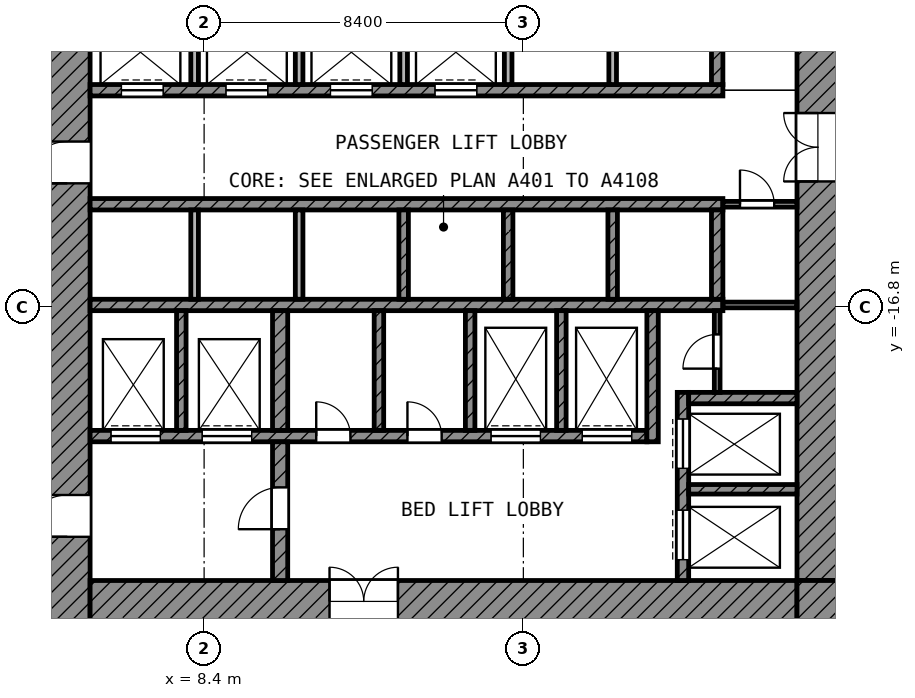
"""IFC4 building model, lengths in metres.
Left out: names, types, materials, properties, quantities, classifications, styles, units other than length and angle.
Written with IfcOpenShell. Run it as: python <this file> out.ifc"""

import sys

from ifc_helpers import new_model, si_unit, direction, frame, frame_2d, origin, place, context, subcontext, project, spatial, rectangle, extrude, element, fill, save


model = new_model("IFC4")
c1 = context("Model", 3, precision=1e-05, world=origin(), true_north=direction((0.0, 1.0)))
c2 = subcontext(c1, "Body", "Model", "MODEL_VIEW")
j1 = project(units=[si_unit("LENGTHUNIT", "METRE"), si_unit("PLANEANGLEUNIT", "RADIAN")], contexts=[c1])
p1 = place(None, origin())
s1 = spatial("IfcSite", under=j1, at=p1, CompositionType="ELEMENT")
p2 = place(p1, origin())
s2 = spatial("IfcBuilding", under=s1, at=p2, CompositionType="ELEMENT")
p3 = place(p2, frame((0.0, 0.0, 89.6)))
s3 = spatial("IfcBuildingStorey", under=s2, at=p3, CompositionType="ELEMENT", Elevation=89.6)
p4 = place(p3, frame((4.8, -25.1, 0.0), z_axis=(0.0, 0.0, 1.0), x_axis=(0.0, 1.0, 0.0)))
e1 = element("IfcWall", 1, at=p4, inside=s3, PredefinedType="SHEAR", context=c2, shape_type="SweptSolid", body=[
    extrude(rectangle(XDim=19.7, YDim=1.2, at=frame_2d((9.85, 0.0))), origin(), (0.0, 0.0, 1.0), 3.7),
])
p5 = place(p4, frame((11.55, 0.0, 0.0)))
e2 = element("IfcOpeningElement", 2, at=p5, cuts=e1, PredefinedType="OPENING", context=c2, shape_type="SweptSolid", body=[
    extrude(rectangle(XDim=1.1, YDim=2.1, at=frame_2d((0.55, 1.05))), frame((0.0, 0.61, 0.0), z_axis=(0.0, -1.0, 0.0), x_axis=(1.0, 0.0, 0.0)), (0.0, 0.0, 1.0), 1.22),
])
p6 = place(p4, frame((2.25, 0.0, 0.0)))
e3 = element("IfcOpeningElement", 3, at=p6, cuts=e1, PredefinedType="OPENING", context=c2, shape_type="SweptSolid", body=[
    extrude(rectangle(XDim=1.1, YDim=2.1, at=frame_2d((0.55, 1.05))), frame((0.0, 0.61, 0.0), z_axis=(0.0, -1.0, 0.0), x_axis=(1.0, 0.0, 0.0)), (0.0, 0.0, 1.0), 1.22),
])
p7 = place(p3, frame((24.55, -24.0, 0.0), z_axis=(0.0, 0.0, 1.0), x_axis=(0.0, 1.0, 0.0)))
e4 = element("IfcWall", 4, at=p7, inside=s3, PredefinedType="SHEAR", context=c2, shape_type="SweptSolid", body=[
    extrude(rectangle(XDim=18.6, YDim=1.1, at=frame_2d((9.3, 0.0))), origin(), (0.0, 0.0, 1.0), 3.7),
])
p8 = place(p7, frame((10.5, 0.0, 0.0)))
e5 = element("IfcOpeningElement", 5, at=p8, cuts=e4, PredefinedType="OPENING", context=c2, shape_type="SweptSolid", body=[
    extrude(rectangle(XDim=1.8, YDim=2.1, at=frame_2d((0.9, 1.05))), frame((0.0, 0.56, 0.0), z_axis=(0.0, -1.0, 0.0), x_axis=(1.0, 0.0, 0.0)), (0.0, 0.0, 1.0), 1.12),
])
p9 = place(p3, frame((5.4, -24.55, 0.0), z_axis=(0.0, 0.0, 1.0), x_axis=(1.0, 0.0, 0.0)))
e6 = element("IfcWall", 6, at=p9, inside=s3, PredefinedType="SHEAR", context=c2, shape_type="SweptSolid", body=[
    extrude(rectangle(XDim=18.6, YDim=1.1, at=frame_2d((9.3, 0.0))), origin(), (0.0, 0.0, 1.0), 3.7),
])
p10 = place(p9, frame((6.3, 0.0, 0.0)))
e7 = element("IfcOpeningElement", 7, at=p10, cuts=e6, PredefinedType="OPENING", context=c2, shape_type="SweptSolid", body=[
    extrude(rectangle(XDim=1.8, YDim=2.1, at=frame_2d((0.9, 1.05))), frame((0.0, 0.56, 0.0), z_axis=(0.0, -1.0, 0.0), x_axis=(1.0, 0.0, 0.0)), (0.0, 0.0, 1.0), 1.12),
])
p11 = place(p3, frame((24.55, -25.1, 0.0), z_axis=(0.0, 0.0, 1.0), x_axis=(0.0, 1.0, 0.0)))
e8 = element("IfcWall", 8, at=p11, inside=s3, PredefinedType="SHEAR", context=c2, shape_type="SweptSolid", body=[
    extrude(rectangle(XDim=1.1, YDim=1.1, at=frame_2d((0.55, 0.0))), origin(), (0.0, 0.0, 1.0), 3.7),
])
p12 = place(p3, frame((5.4, -11.1, 0.0), z_axis=(0.0, 0.0, 1.0), x_axis=(1.0, 0.0, 0.0)))
e9 = element("IfcWall", 9, at=p12, inside=s3, PredefinedType="SHEAR", context=c2, shape_type="SweptSolid", body=[
    extrude(rectangle(XDim=16.65, YDim=0.3, at=frame_2d((8.325, 0.0))), origin(), (0.0, 0.0, 1.0), 3.7),
])
p13 = place(p12, frame((0.825, 0.0, 0.0)))
e10 = element("IfcOpeningElement", 10, at=p13, cuts=e9, PredefinedType="OPENING", context=c2, shape_type="SweptSolid", body=[
    extrude(rectangle(XDim=1.1, YDim=2.1, at=frame_2d((0.55, 1.05))), frame((0.0, 0.16, 0.0), z_axis=(0.0, -1.0, 0.0), x_axis=(1.0, 0.0, 0.0)), (0.0, 0.0, 1.0), 0.32),
])
p14 = place(p12, frame((3.575, 0.0, 0.0)))
e11 = element("IfcOpeningElement", 11, at=p14, cuts=e9, PredefinedType="OPENING", context=c2, shape_type="SweptSolid", body=[
    extrude(rectangle(XDim=1.1, YDim=2.1, at=frame_2d((0.55, 1.05))), frame((0.0, 0.16, 0.0), z_axis=(0.0, -1.0, 0.0), x_axis=(1.0, 0.0, 0.0)), (0.0, 0.0, 1.0), 0.32),
])
p15 = place(p12, frame((6.325, 0.0, 0.0)))
e12 = element("IfcOpeningElement", 12, at=p15, cuts=e9, PredefinedType="OPENING", context=c2, shape_type="SweptSolid", body=[
    extrude(rectangle(XDim=1.1, YDim=2.1, at=frame_2d((0.55, 1.05))), frame((0.0, 0.16, 0.0), z_axis=(0.0, -1.0, 0.0), x_axis=(1.0, 0.0, 0.0)), (0.0, 0.0, 1.0), 0.32),
])
p16 = place(p12, frame((9.075, 0.0, 0.0)))
e13 = element("IfcOpeningElement", 13, at=p16, cuts=e9, PredefinedType="OPENING", context=c2, shape_type="SweptSolid", body=[
    extrude(rectangle(XDim=1.1, YDim=2.1, at=frame_2d((0.55, 1.05))), frame((0.0, 0.16, 0.0), z_axis=(0.0, -1.0, 0.0), x_axis=(1.0, 0.0, 0.0)), (0.0, 0.0, 1.0), 0.32),
])
for number, where, z_axis, x_axis in (
    (14, (5.4, -14.1, 0.0), (0.0, 0.0, 1.0), (1.0, 0.0, 0.0)),
    (15, (5.4, -16.75, 0.0), (0.0, 0.0, 1.0), (1.0, 0.0, 0.0)),
):
    element("IfcWall", number, at=place(p3, frame(where, z_axis=z_axis, x_axis=x_axis)), inside=s3, PredefinedType="SHEAR", context=c2, shape_type="SweptSolid", body=[
        extrude(rectangle(XDim=16.65, YDim=0.3, at=frame_2d((8.325, 0.0))), origin(), (0.0, 0.0, 1.0), 3.7),
    ])
p17 = place(p3, frame((5.4, -20.2, 0.0), z_axis=(0.0, 0.0, 1.0), x_axis=(1.0, 0.0, 0.0)))
e16 = element("IfcWall", 16, at=p17, inside=s3, PredefinedType="SHEAR", context=c2, shape_type="SweptSolid", body=[
    extrude(rectangle(XDim=14.65, YDim=0.3, at=frame_2d((7.325, 0.0))), origin(), (0.0, 0.0, 1.0), 3.7),
])
p18 = place(p17, frame((10.55, 0.0, 0.0)))
e17 = element("IfcOpeningElement", 17, at=p18, cuts=e16, PredefinedType="OPENING", context=c2, shape_type="SweptSolid", body=[
    extrude(rectangle(XDim=1.3, YDim=2.1, at=frame_2d((0.65, 1.05))), frame((0.0, 0.16, 0.0), z_axis=(0.0, -1.0, 0.0), x_axis=(1.0, 0.0, 0.0)), (0.0, 0.0, 1.0), 0.32),
])
p19 = place(p17, frame((12.95, 0.0, 0.0)))
e18 = element("IfcOpeningElement", 18, at=p19, cuts=e16, PredefinedType="OPENING", context=c2, shape_type="SweptSolid", body=[
    extrude(rectangle(XDim=1.3, YDim=2.1, at=frame_2d((0.65, 1.05))), frame((0.0, 0.16, 0.0), z_axis=(0.0, -1.0, 0.0), x_axis=(1.0, 0.0, 0.0)), (0.0, 0.0, 1.0), 0.32),
])
p20 = place(p17, frame((0.55, 0.0, 0.0)))
e19 = element("IfcOpeningElement", 19, at=p20, cuts=e16, PredefinedType="OPENING", context=c2, shape_type="SweptSolid", body=[
    extrude(rectangle(XDim=1.3, YDim=2.1, at=frame_2d((0.65, 1.05))), frame((0.0, 0.16, 0.0), z_axis=(0.0, -1.0, 0.0), x_axis=(1.0, 0.0, 0.0)), (0.0, 0.0, 1.0), 0.32),
])
p21 = place(p17, frame((2.95, 0.0, 0.0)))
e20 = element("IfcOpeningElement", 20, at=p21, cuts=e16, PredefinedType="OPENING", context=c2, shape_type="SweptSolid", body=[
    extrude(rectangle(XDim=1.3, YDim=2.1, at=frame_2d((0.65, 1.05))), frame((0.0, 0.16, 0.0), z_axis=(0.0, -1.0, 0.0), x_axis=(1.0, 0.0, 0.0)), (0.0, 0.0, 1.0), 0.32),
])
p22 = place(p17, frame((5.95, 0.0, 0.0)))
e21 = element("IfcOpeningElement", 21, at=p22, cuts=e16, PredefinedType="OPENING", context=c2, shape_type="SweptSolid", body=[
    extrude(rectangle(XDim=0.9, YDim=2.1, at=frame_2d((0.45, 1.05))), frame((0.0, 0.16, 0.0), z_axis=(0.0, -1.0, 0.0), x_axis=(1.0, 0.0, 0.0)), (0.0, 0.0, 1.0), 0.32),
])
p23 = place(p17, frame((8.35, 0.0, 0.0)))
e22 = element("IfcOpeningElement", 22, at=p23, cuts=e16, PredefinedType="OPENING", context=c2, shape_type="SweptSolid", body=[
    extrude(rectangle(XDim=0.9, YDim=2.1, at=frame_2d((0.45, 1.05))), frame((0.0, 0.16, 0.0), z_axis=(0.0, -1.0, 0.0), x_axis=(1.0, 0.0, 0.0)), (0.0, 0.0, 1.0), 0.32),
])
p24 = place(p3, frame((10.4, -24.0, 0.0), z_axis=(0.0, 0.0, 1.0), x_axis=(0.0, 1.0, 0.0)))
e23 = element("IfcWall", 23, at=p24, inside=s3, PredefinedType="SHEAR", context=c2, shape_type="SweptSolid", body=[
    extrude(rectangle(XDim=3.65, YDim=0.4, at=frame_2d((1.825, 0.0))), origin(), (0.0, 0.0, 1.0), 3.7),
])
p25 = place(p24, frame((1.35, 0.0, 0.0)))
e24 = element("IfcOpeningElement", 24, at=p25, cuts=e23, PredefinedType="OPENING", context=c2, shape_type="SweptSolid", body=[
    extrude(rectangle(XDim=1.1, YDim=2.1, at=frame_2d((0.55, 1.05))), frame((0.0, 0.21, 0.0), z_axis=(0.0, -1.0, 0.0), x_axis=(1.0, 0.0, 0.0)), (0.0, 0.0, 1.0), 0.42),
])
p26 = place(p3, frame((10.4, -20.05, 0.0), z_axis=(0.0, 0.0, 1.0), x_axis=(0.0, 1.0, 0.0)))
e25 = element("IfcWall", 25, at=p26, inside=s3, PredefinedType="SHEAR", context=c2, shape_type="SweptSolid", body=[
    extrude(rectangle(XDim=3.15, YDim=0.4, at=frame_2d((1.575, 0.0))), origin(), (0.0, 0.0, 1.0), 3.7),
])
p27 = place(p3, frame((20.2, -20.35, 0.0), z_axis=(0.0, 0.0, 1.0), x_axis=(0.0, 1.0, 0.0)))
e26 = element("IfcWall", 26, at=p27, inside=s3, PredefinedType="SHEAR", context=c2, shape_type="SweptSolid", body=[
    extrude(rectangle(XDim=3.45, YDim=0.3, at=frame_2d((1.725, 0.0))), origin(), (0.0, 0.0, 1.0), 3.7),
])
p28 = place(p3, frame((21.9, -10.95, 0.0), z_axis=(0.0, 0.0, 1.0), x_axis=(0.0, 1.0, 0.0)))
e27 = element("IfcWall", 27, at=p28, inside=s3, PredefinedType="SHEAR", context=c2, shape_type="SweptSolid", body=[
    extrude(rectangle(XDim=2.35, YDim=0.3, at=frame_2d((1.175, 0.0))), origin(), (0.0, 0.0, 1.0), 3.7),
])
p29 = place(p3, frame((21.9, -16.6, 0.0), z_axis=(0.0, 0.0, 1.0), x_axis=(0.0, 1.0, 0.0)))
e28 = element("IfcWall", 28, at=p29, inside=s3, PredefinedType="SHEAR", context=c2, shape_type="SweptSolid", body=[
    extrude(rectangle(XDim=2.35, YDim=0.3, at=frame_2d((1.175, 0.0))), origin(), (0.0, 0.0, 1.0), 3.7),
])
p30 = place(p3, frame((21.15, -19.2, 0.0), z_axis=(0.0, 0.0, 1.0), x_axis=(1.0, 0.0, 0.0)))
e29 = element("IfcWall", 29, at=p30, inside=s3, PredefinedType="SHEAR", context=c2, shape_type="SweptSolid", body=[
    extrude(rectangle(XDim=2.85, YDim=0.3, at=frame_2d((1.425, 0.0))), origin(), (0.0, 0.0, 1.0), 3.7),
])
p31 = place(p3, frame((21.0, -24.0, 0.0), z_axis=(0.0, 0.0, 1.0), x_axis=(0.0, 1.0, 0.0)))
e30 = element("IfcWall", 30, at=p31, inside=s3, PredefinedType="SHEAR", context=c2, shape_type="SweptSolid", body=[
    extrude(rectangle(XDim=4.95, YDim=0.3, at=frame_2d((2.475, 0.0))), origin(), (0.0, 0.0, 1.0), 3.7),
])
p32 = place(p31, frame((2.95, 0.0, 0.0)))
e31 = element("IfcOpeningElement", 31, at=p32, cuts=e30, PredefinedType="OPENING", context=c2, shape_type="SweptSolid", body=[
    extrude(rectangle(XDim=1.3, YDim=2.1, at=frame_2d((0.65, 1.05))), frame((0.0, 0.16, 0.0), z_axis=(0.0, -1.0, 0.0), x_axis=(1.0, 0.0, 0.0)), (0.0, 0.0, 1.0), 0.32),
])
p33 = place(p31, frame((0.55, 0.0, 0.0)))
e32 = element("IfcOpeningElement", 32, at=p33, cuts=e30, PredefinedType="OPENING", context=c2, shape_type="SweptSolid", body=[
    extrude(rectangle(XDim=1.3, YDim=2.1, at=frame_2d((0.65, 1.05))), frame((0.0, 0.16, 0.0), z_axis=(0.0, -1.0, 0.0), x_axis=(1.0, 0.0, 0.0)), (0.0, 0.0, 1.0), 0.32),
])
p34 = place(p3, frame((21.15, -21.6, 0.0), z_axis=(0.0, 0.0, 1.0), x_axis=(1.0, 0.0, 0.0)))
e33 = element("IfcWall", 33, at=p34, inside=s3, PredefinedType="SHEAR", context=c2, shape_type="SweptSolid", body=[
    extrude(rectangle(XDim=2.85, YDim=0.25, at=frame_2d((1.425, 0.0))), origin(), (0.0, 0.0, 1.0), 3.7),
])
for number, where, z_axis, x_axis in (
    (34, (7.8, -20.05, 0.0), (0.0, 0.0, 1.0), (0.0, 1.0, 0.0)),
    (35, (13.0, -20.05, 0.0), (0.0, 0.0, 1.0), (0.0, 1.0, 0.0)),
    (36, (15.4, -20.05, 0.0), (0.0, 0.0, 1.0), (0.0, 1.0, 0.0)),
    (37, (17.8, -20.05, 0.0), (0.0, 0.0, 1.0), (0.0, 1.0, 0.0)),
):
    element("IfcWall", number, at=place(p3, frame(where, z_axis=z_axis, x_axis=x_axis)), inside=s3, PredefinedType="SHEAR", context=c2, shape_type="SweptSolid", body=[
        extrude(rectangle(XDim=3.15, YDim=0.25, at=frame_2d((1.575, 0.0))), origin(), (0.0, 0.0, 1.0), 3.7),
    ])
for number, where, z_axis, x_axis in (
    (38, (8.15, -10.95, 0.0), (0.0, 0.0, 1.0), (0.0, 1.0, 0.0)),
    (39, (10.9, -10.95, 0.0), (0.0, 0.0, 1.0), (0.0, 1.0, 0.0)),
    (40, (13.65, -10.95, 0.0), (0.0, 0.0, 1.0), (0.0, 1.0, 0.0)),
    (41, (16.4, -10.95, 0.0), (0.0, 0.0, 1.0), (0.0, 1.0, 0.0)),
    (42, (19.15, -10.95, 0.0), (0.0, 0.0, 1.0), (0.0, 1.0, 0.0)),
):
    element("IfcWall", number, at=place(p3, frame(where, z_axis=z_axis, x_axis=x_axis)), inside=s3, PredefinedType="PARTITIONING", context=c2, shape_type="SweptSolid", body=[
        extrude(rectangle(XDim=2.35, YDim=0.2, at=frame_2d((1.175, 0.0))), origin(), (0.0, 0.0, 1.0), 3.7),
    ])
for number, where, z_axis, x_axis in (
    (43, (8.15, -16.6, 0.0), (0.0, 0.0, 1.0), (0.0, 1.0, 0.0)),
    (44, (10.9, -16.6, 0.0), (0.0, 0.0, 1.0), (0.0, 1.0, 0.0)),
):
    element("IfcWall", number, at=place(p3, frame(where, z_axis=z_axis, x_axis=x_axis)), inside=s3, PredefinedType="PARTITIONING", context=c2, shape_type="SweptSolid", body=[
        extrude(rectangle(XDim=2.35, YDim=0.2, at=frame_2d((1.175, 0.0))), origin(), (0.0, 0.0, 1.0), 3.7),
    ])
for number, where, z_axis, x_axis in (
    (45, (13.65, -16.6, 0.0), (0.0, 0.0, 1.0), (0.0, 1.0, 0.0)),
    (46, (16.4, -16.6, 0.0), (0.0, 0.0, 1.0), (0.0, 1.0, 0.0)),
    (47, (19.15, -16.6, 0.0), (0.0, 0.0, 1.0), (0.0, 1.0, 0.0)),
):
    element("IfcWall", number, at=place(p3, frame(where, z_axis=z_axis, x_axis=x_axis)), inside=s3, PredefinedType="SHEAR", context=c2, shape_type="SweptSolid", body=[
        extrude(rectangle(XDim=2.35, YDim=0.25, at=frame_2d((1.175, 0.0))), origin(), (0.0, 0.0, 1.0), 3.7),
    ])
p35 = place(p3, frame((21.9, -19.05, 0.0), z_axis=(0.0, 0.0, 1.0), x_axis=(0.0, 1.0, 0.0)))
e48 = element("IfcWall", 48, at=p35, inside=s3, PredefinedType="PARTITIONING", context=c2, shape_type="SweptSolid", body=[
    extrude(rectangle(XDim=2.15, YDim=0.15, at=frame_2d((1.075, 0.0))), origin(), (0.0, 0.0, 1.0), 3.7),
])
p36 = place(p35, frame((0.625, 0.0, 0.0)))
e49 = element("IfcOpeningElement", 49, at=p36, cuts=e48, PredefinedType="OPENING", context=c2, shape_type="SweptSolid", body=[
    extrude(rectangle(XDim=0.9, YDim=2.1, at=frame_2d((0.45, 1.05))), frame((0.0, 0.085, 0.0), z_axis=(0.0, -1.0, 0.0), x_axis=(1.0, 0.0, 0.0)), (0.0, 0.0, 1.0), 0.17),
])
p37 = place(p3, frame((22.05, -16.75, 0.0), z_axis=(0.0, 0.0, 1.0), x_axis=(1.0, 0.0, 0.0)))
e50 = element("IfcWall", 50, at=p37, inside=s3, PredefinedType="PARTITIONING", context=c2, shape_type="SweptSolid", body=[
    extrude(rectangle(XDim=1.95, YDim=0.15, at=frame_2d((0.975, 0.0))), origin(), (0.0, 0.0, 1.0), 3.7),
])
p38 = place(p3, frame((22.05, -14.1, 0.0), z_axis=(0.0, 0.0, 1.0), x_axis=(1.0, 0.0, 0.0)))
e51 = element("IfcWall", 51, at=p38, inside=s3, PredefinedType="PARTITIONING", context=c2, shape_type="SweptSolid", body=[
    extrude(rectangle(XDim=1.95, YDim=0.15, at=frame_2d((0.975, 0.0))), origin(), (0.0, 0.0, 1.0), 3.7),
])
p39 = place(p38, frame((0.45, 0.0, 0.0)))
e52 = element("IfcOpeningElement", 52, at=p39, cuts=e51, PredefinedType="OPENING", context=c2, shape_type="SweptSolid", body=[
    extrude(rectangle(XDim=0.9, YDim=2.1, at=frame_2d((0.45, 1.05))), frame((0.0, 0.085, 0.0), z_axis=(0.0, -1.0, 0.0), x_axis=(1.0, 0.0, 0.0)), (0.0, 0.0, 1.0), 0.17),
])
p40 = place(p13, origin())
e53 = element("IfcDoor", 53, at=p40, inside=s3, OperationType="DOUBLE_DOOR_SLIDING", PredefinedType="DOOR", context=c2, shape_type="SweptSolid", body=[
    extrude(rectangle(XDim=1.1, YDim=2.1, at=frame_2d((0.55, 1.05))), frame((0.0, 0.025, 0.0), z_axis=(0.0, -1.0, 0.0), x_axis=(1.0, 0.0, 0.0)), (0.0, 0.0, 1.0), 0.05),
])
fill(e10, e53)
p41 = place(p14, origin())
e54 = element("IfcDoor", 54, at=p41, inside=s3, OperationType="DOUBLE_DOOR_SLIDING", PredefinedType="DOOR", context=c2, shape_type="SweptSolid", body=[
    extrude(rectangle(XDim=1.1, YDim=2.1, at=frame_2d((0.55, 1.05))), frame((0.0, 0.025, 0.0), z_axis=(0.0, -1.0, 0.0), x_axis=(1.0, 0.0, 0.0)), (0.0, 0.0, 1.0), 0.05),
])
fill(e11, e54)
p42 = place(p15, origin())
e55 = element("IfcDoor", 55, at=p42, inside=s3, OperationType="DOUBLE_DOOR_SLIDING", PredefinedType="DOOR", context=c2, shape_type="SweptSolid", body=[
    extrude(rectangle(XDim=1.1, YDim=2.1, at=frame_2d((0.55, 1.05))), frame((0.0, 0.025, 0.0), z_axis=(0.0, -1.0, 0.0), x_axis=(1.0, 0.0, 0.0)), (0.0, 0.0, 1.0), 0.05),
])
fill(e12, e55)
p43 = place(p16, origin())
e56 = element("IfcDoor", 56, at=p43, inside=s3, OperationType="DOUBLE_DOOR_SLIDING", PredefinedType="DOOR", context=c2, shape_type="SweptSolid", body=[
    extrude(rectangle(XDim=1.1, YDim=2.1, at=frame_2d((0.55, 1.05))), frame((0.0, 0.025, 0.0), z_axis=(0.0, -1.0, 0.0), x_axis=(1.0, 0.0, 0.0)), (0.0, 0.0, 1.0), 0.05),
])
fill(e13, e56)
p44 = place(p32, origin())
e57 = element("IfcDoor", 57, at=p44, inside=s3, OperationType="DOUBLE_DOOR_SLIDING", PredefinedType="DOOR", context=c2, shape_type="SweptSolid", body=[
    extrude(rectangle(XDim=1.3, YDim=2.1, at=frame_2d((0.65, 1.05))), frame((0.0, 0.025, 0.0), z_axis=(0.0, -1.0, 0.0), x_axis=(1.0, 0.0, 0.0)), (0.0, 0.0, 1.0), 0.05),
])
fill(e31, e57)
p45 = place(p33, origin())
e58 = element("IfcDoor", 58, at=p45, inside=s3, OperationType="DOUBLE_DOOR_SLIDING", PredefinedType="DOOR", context=c2, shape_type="SweptSolid", body=[
    extrude(rectangle(XDim=1.3, YDim=2.1, at=frame_2d((0.65, 1.05))), frame((0.0, 0.025, 0.0), z_axis=(0.0, -1.0, 0.0), x_axis=(1.0, 0.0, 0.0)), (0.0, 0.0, 1.0), 0.05),
])
fill(e32, e58)
p46 = place(p18, origin())
e59 = element("IfcDoor", 59, at=p46, inside=s3, OperationType="DOUBLE_DOOR_SLIDING", PredefinedType="DOOR", context=c2, shape_type="SweptSolid", body=[
    extrude(rectangle(XDim=1.3, YDim=2.1, at=frame_2d((0.65, 1.05))), frame((0.0, 0.025, 0.0), z_axis=(0.0, -1.0, 0.0), x_axis=(1.0, 0.0, 0.0)), (0.0, 0.0, 1.0), 0.05),
])
fill(e17, e59)
p47 = place(p19, origin())
e60 = element("IfcDoor", 60, at=p47, inside=s3, OperationType="DOUBLE_DOOR_SLIDING", PredefinedType="DOOR", context=c2, shape_type="SweptSolid", body=[
    extrude(rectangle(XDim=1.3, YDim=2.1, at=frame_2d((0.65, 1.05))), frame((0.0, 0.025, 0.0), z_axis=(0.0, -1.0, 0.0), x_axis=(1.0, 0.0, 0.0)), (0.0, 0.0, 1.0), 0.05),
])
fill(e18, e60)
p48 = place(p20, origin())
e61 = element("IfcDoor", 61, at=p48, inside=s3, OperationType="DOUBLE_DOOR_SLIDING", PredefinedType="DOOR", context=c2, shape_type="SweptSolid", body=[
    extrude(rectangle(XDim=1.3, YDim=2.1, at=frame_2d((0.65, 1.05))), frame((0.0, 0.025, 0.0), z_axis=(0.0, -1.0, 0.0), x_axis=(1.0, 0.0, 0.0)), (0.0, 0.0, 1.0), 0.05),
])
fill(e19, e61)
p49 = place(p21, origin())
e62 = element("IfcDoor", 62, at=p49, inside=s3, OperationType="DOUBLE_DOOR_SLIDING", PredefinedType="DOOR", context=c2, shape_type="SweptSolid", body=[
    extrude(rectangle(XDim=1.3, YDim=2.1, at=frame_2d((0.65, 1.05))), frame((0.0, 0.025, 0.0), z_axis=(0.0, -1.0, 0.0), x_axis=(1.0, 0.0, 0.0)), (0.0, 0.0, 1.0), 0.05),
])
fill(e20, e62)
p50 = place(p5, origin())
e63 = element("IfcDoor", 63, at=p50, inside=s3, OperationType="SINGLE_SWING_LEFT", PredefinedType="DOOR", context=c2, shape_type="SweptSolid", body=[
    extrude(rectangle(XDim=1.1, YDim=2.1, at=frame_2d((0.55, 1.05))), frame((0.0, 0.025, 0.0), z_axis=(0.0, -1.0, 0.0), x_axis=(1.0, 0.0, 0.0)), (0.0, 0.0, 1.0), 0.05),
])
fill(e2, e63)
p51 = place(p6, origin())
e64 = element("IfcDoor", 64, at=p51, inside=s3, OperationType="SINGLE_SWING_LEFT", PredefinedType="DOOR", context=c2, shape_type="SweptSolid", body=[
    extrude(rectangle(XDim=1.1, YDim=2.1, at=frame_2d((0.55, 1.05))), frame((0.0, 0.025, 0.0), z_axis=(0.0, -1.0, 0.0), x_axis=(1.0, 0.0, 0.0)), (0.0, 0.0, 1.0), 0.05),
])
fill(e3, e64)
p52 = place(p25, origin())
e65 = element("IfcDoor", 65, at=p52, inside=s3, OperationType="SINGLE_SWING_LEFT", PredefinedType="DOOR", context=c2, shape_type="SweptSolid", body=[
    extrude(rectangle(XDim=1.1, YDim=2.1, at=frame_2d((0.55, 1.05))), frame((0.0, 0.025, 0.0), z_axis=(0.0, -1.0, 0.0), x_axis=(1.0, 0.0, 0.0)), (0.0, 0.0, 1.0), 0.05),
])
fill(e24, e65)
p53 = place(p8, origin())
e66 = element("IfcDoor", 66, at=p53, inside=s3, OperationType="DOUBLE_DOOR_SINGLE_SWING", PredefinedType="DOOR", context=c2, shape_type="SweptSolid", body=[
    extrude(rectangle(XDim=1.8, YDim=2.1, at=frame_2d((0.9, 1.05))), frame((0.0, 0.025, 0.0), z_axis=(0.0, -1.0, 0.0), x_axis=(1.0, 0.0, 0.0)), (0.0, 0.0, 1.0), 0.05),
])
fill(e5, e66)
p54 = place(p10, origin())
e67 = element("IfcDoor", 67, at=p54, inside=s3, OperationType="DOUBLE_DOOR_SINGLE_SWING", PredefinedType="DOOR", context=c2, shape_type="SweptSolid", body=[
    extrude(rectangle(XDim=1.8, YDim=2.1, at=frame_2d((0.9, 1.05))), frame((0.0, 0.025, 0.0), z_axis=(0.0, -1.0, 0.0), x_axis=(1.0, 0.0, 0.0)), (0.0, 0.0, 1.0), 0.05),
])
fill(e7, e67)
p55 = place(p39, origin())
e68 = element("IfcDoor", 68, at=p55, inside=s3, OperationType="SINGLE_SWING_LEFT", PredefinedType="DOOR", context=c2, shape_type="SweptSolid", body=[
    extrude(rectangle(XDim=0.9, YDim=2.1, at=frame_2d((0.45, 1.05))), frame((0.0, 0.025, 0.0), z_axis=(0.0, -1.0, 0.0), x_axis=(1.0, 0.0, 0.0)), (0.0, 0.0, 1.0), 0.05),
])
fill(e52, e68)
p56 = place(p36, origin())
e69 = element("IfcDoor", 69, at=p56, inside=s3, OperationType="SINGLE_SWING_LEFT", PredefinedType="DOOR", context=c2, shape_type="SweptSolid", body=[
    extrude(rectangle(XDim=0.9, YDim=2.1, at=frame_2d((0.45, 1.05))), frame((0.0, 0.025, 0.0), z_axis=(0.0, -1.0, 0.0), x_axis=(1.0, 0.0, 0.0)), (0.0, 0.0, 1.0), 0.05),
])
fill(e49, e69)
p57 = place(p22, origin())
e70 = element("IfcDoor", 70, at=p57, inside=s3, OperationType="SINGLE_SWING_LEFT", PredefinedType="DOOR", context=c2, shape_type="SweptSolid", body=[
    extrude(rectangle(XDim=0.9, YDim=2.1, at=frame_2d((0.45, 1.05))), frame((0.0, 0.025, 0.0), z_axis=(0.0, -1.0, 0.0), x_axis=(1.0, 0.0, 0.0)), (0.0, 0.0, 1.0), 0.05),
])
fill(e21, e70)
p58 = place(p23, origin())
e71 = element("IfcDoor", 71, at=p58, inside=s3, OperationType="SINGLE_SWING_LEFT", PredefinedType="DOOR", context=c2, shape_type="SweptSolid", body=[
    extrude(rectangle(XDim=0.9, YDim=2.1, at=frame_2d((0.45, 1.05))), frame((0.0, 0.025, 0.0), z_axis=(0.0, -1.0, 0.0), x_axis=(1.0, 0.0, 0.0)), (0.0, 0.0, 1.0), 0.05),
])
fill(e22, e71)
save(model, sys.argv[1])
